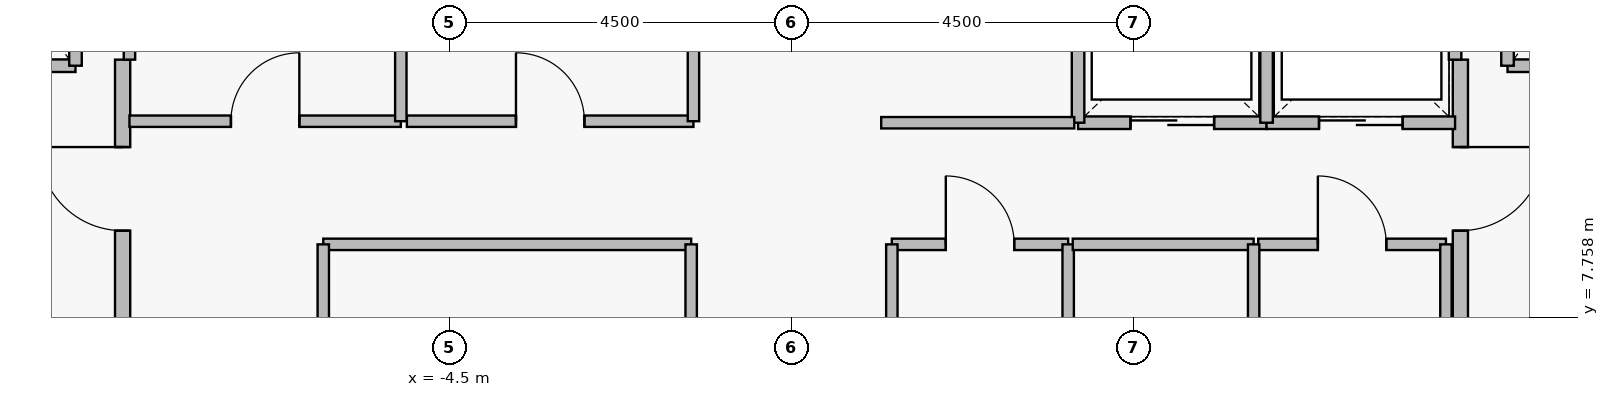
"""IFC4 building model, lengths in metres.
Left out: names, types, materials, properties, quantities, classifications, styles, units other than length and angle.
Written with IfcOpenShell. Run it as: python <this file> out.ifc"""

import sys

from ifc_helpers import new_model, si_unit, direction, frame, frame_2d, origin, place, context, subcontext, project, spatial, rectangle, extrude, element, fill, save


model = new_model("IFC4")
c1 = context("Model", 3, precision=1e-05, world=origin(), true_north=direction((0.0, 1.0)))
c2 = subcontext(c1, "Body", "Model", "MODEL_VIEW")
j1 = project(units=[si_unit("LENGTHUNIT", "METRE"), si_unit("PLANEANGLEUNIT", "RADIAN")], contexts=[c1])
p1 = place(None, origin())
s1 = spatial("IfcSite", under=j1, at=p1, CompositionType="ELEMENT")
p2 = place(p1, origin())
s2 = spatial("IfcBuilding", under=s1, at=p2, CompositionType="ELEMENT")
p3 = place(p2, frame((0.0, 0.0, 284.05)))
s3 = spatial("IfcBuildingStorey", under=s2, at=p3, CompositionType="ELEMENT", Elevation=284.05)
p4 = place(p3, frame((-8.8, 5.05, 0.0), z_axis=(0.0, 0.0, 1.0), x_axis=(0.0, 1.0, 0.0)))
e1 = element("IfcWall", 1, at=p4, inside=s3, PredefinedType="PARTITIONING", context=c2, shape_type="SweptSolid", body=[
    extrude(rectangle(XDim=6.1, YDim=0.2, at=frame_2d((3.05, 0.0))), origin(), (0.0, 0.0, 1.0), 4.18),
])
p5 = place(p4, frame((0.25, 0.0, 0.0)))
e2 = element("IfcOpeningElement", 2, at=p5, cuts=e1, PredefinedType="OPENING", context=c2, shape_type="SweptSolid", body=[
    extrude(rectangle(XDim=1.1, YDim=2.2, at=frame_2d((0.55, 1.1))), frame((0.0, 0.11, 0.0), z_axis=(0.0, -1.0, 0.0), x_axis=(1.0, 0.0, 0.0)), (0.0, 0.0, 1.0), 0.22),
])
p6 = place(p4, frame((3.85, 0.0, 0.0)))
e3 = element("IfcOpeningElement", 3, at=p6, cuts=e1, PredefinedType="OPENING", context=c2, shape_type="SweptSolid", body=[
    extrude(rectangle(XDim=1.1, YDim=2.2, at=frame_2d((0.55, 1.1))), frame((0.0, 0.11, 0.0), z_axis=(0.0, -1.0, 0.0), x_axis=(1.0, 0.0, 0.0)), (0.0, 0.0, 1.0), 0.22),
])
p7 = place(p3, frame((8.8, 11.15, 0.0), z_axis=(0.0, 0.0, 1.0), x_axis=(0.0, -1.0, 0.0)))
e4 = element("IfcWall", 4, at=p7, inside=s3, PredefinedType="PARTITIONING", context=c2, shape_type="SweptSolid", body=[
    extrude(rectangle(XDim=6.1, YDim=0.2, at=frame_2d((3.05, 0.0))), origin(), (0.0, 0.0, 1.0), 4.18),
])
p8 = place(p7, frame((1.15, 0.0, 0.0)))
e5 = element("IfcOpeningElement", 5, at=p8, cuts=e4, PredefinedType="OPENING", context=c2, shape_type="SweptSolid", body=[
    extrude(rectangle(XDim=1.1, YDim=2.2, at=frame_2d((0.55, 1.1))), frame((0.0, 0.11, 0.0), z_axis=(0.0, -1.0, 0.0), x_axis=(1.0, 0.0, 0.0)), (0.0, 0.0, 1.0), 0.22),
])
p9 = place(p7, frame((4.75, 0.0, 0.0)))
e6 = element("IfcOpeningElement", 6, at=p9, cuts=e4, PredefinedType="OPENING", context=c2, shape_type="SweptSolid", body=[
    extrude(rectangle(XDim=1.1, YDim=2.2, at=frame_2d((0.55, 1.1))), frame((0.0, 0.11, 0.0), z_axis=(0.0, -1.0, 0.0), x_axis=(1.0, 0.0, 0.0)), (0.0, 0.0, 1.0), 0.22),
])
p10 = place(p3, frame((-11.58, 11.07, 0.0), z_axis=(0.0, 0.0, 1.0), x_axis=(1.0, 0.0, 0.0)))
e7 = element("IfcWall", 7, at=p10, inside=s3, PredefinedType="PARTITIONING", context=c2, shape_type="SweptSolid", body=[
    extrude(rectangle(XDim=2.16, YDim=0.165, at=frame_2d((1.08, 0.0))), origin(), (0.0, 0.0, 1.0), 4.18),
])
p11 = place(p10, frame((0.53, 0.0, 0.0)))
e8 = element("IfcOpeningElement", 8, at=p11, cuts=e7, PredefinedType="OPENING", context=c2, shape_type="SweptSolid", body=[
    extrude(rectangle(XDim=1.15, YDim=2.25, at=frame_2d((0.575, 1.125))), frame((0.0, 0.093, 0.0), z_axis=(0.0, -1.0, 0.0), x_axis=(1.0, 0.0, 0.0)), (0.0, 0.0, 1.0), 0.185),
])
p12 = place(p3, frame((9.42, 11.07, 0.0), z_axis=(0.0, 0.0, 1.0), x_axis=(1.0, 0.0, 0.0)))
e9 = element("IfcWall", 9, at=p12, inside=s3, PredefinedType="PARTITIONING", context=c2, shape_type="SweptSolid", body=[
    extrude(rectangle(XDim=2.16, YDim=0.165, at=frame_2d((1.08, 0.0))), origin(), (0.0, 0.0, 1.0), 4.18),
])
p13 = place(p12, frame((0.53, 0.0, 0.0)))
e10 = element("IfcOpeningElement", 10, at=p13, cuts=e9, PredefinedType="OPENING", context=c2, shape_type="SweptSolid", body=[
    extrude(rectangle(XDim=1.15, YDim=2.25, at=frame_2d((0.575, 1.125))), frame((0.0, 0.093, 0.0), z_axis=(0.0, -1.0, 0.0), x_axis=(1.0, 0.0, 0.0)), (0.0, 0.0, 1.0), 0.185),
])
p14 = place(p3, frame((3.77, 10.32, 0.0), z_axis=(0.0, 0.0, 1.0), x_axis=(1.0, 0.0, 0.0)))
e11 = element("IfcWall", 11, at=p14, inside=s3, PredefinedType="PARTITIONING", context=c2, shape_type="SweptSolid", body=[
    extrude(rectangle(XDim=2.48, YDim=0.165, at=frame_2d((1.24, 0.0))), origin(), (0.0, 0.0, 1.0), 4.18),
])
p15 = place(p14, frame((0.69, 0.0, 0.0)))
e12 = element("IfcOpeningElement", 12, at=p15, cuts=e11, PredefinedType="OPENING", context=c2, shape_type="SweptSolid", body=[
    extrude(rectangle(XDim=1.1, YDim=2.25, at=frame_2d((0.55, 1.125))), frame((0.0, 0.093, 0.0), z_axis=(0.0, -1.0, 0.0), x_axis=(1.0, 0.0, 0.0)), (0.0, 0.0, 1.0), 0.185),
])
p16 = place(p3, frame((6.25, 10.32, 0.0), z_axis=(0.0, 0.0, 1.0), x_axis=(1.0, 0.0, 0.0)))
e13 = element("IfcWall", 13, at=p16, inside=s3, PredefinedType="PARTITIONING", context=c2, shape_type="SweptSolid", body=[
    extrude(rectangle(XDim=2.48, YDim=0.165, at=frame_2d((1.24, 0.0))), origin(), (0.0, 0.0, 1.0), 4.18),
])
p17 = place(p16, frame((0.69, 0.0, 0.0)))
e14 = element("IfcOpeningElement", 14, at=p17, cuts=e13, PredefinedType="OPENING", context=c2, shape_type="SweptSolid", body=[
    extrude(rectangle(XDim=1.1, YDim=2.25, at=frame_2d((0.55, 1.125))), frame((0.0, 0.093, 0.0), z_axis=(0.0, -1.0, 0.0), x_axis=(1.0, 0.0, 0.0)), (0.0, 0.0, 1.0), 0.185),
])
p18 = place(p3, frame((-8.71, 10.34, 0.0), z_axis=(0.0, 0.0, 1.0), x_axis=(1.0, 0.0, 0.0)))
e15 = element("IfcWall", 15, at=p18, inside=s3, PredefinedType="PARTITIONING", context=c2, shape_type="SweptSolid", body=[
    extrude(rectangle(XDim=3.57, YDim=0.15, at=frame_2d((1.785, 0.0))), origin(), (0.0, 0.0, 1.0), 4.18),
])
p19 = place(p18, frame((1.335, 0.0, 0.0)))
e16 = element("IfcOpeningElement", 16, at=p19, cuts=e15, PredefinedType="OPENING", context=c2, shape_type="SweptSolid", body=[
    extrude(rectangle(XDim=0.9, YDim=2.15, at=frame_2d((0.45, 1.075))), frame((0.0, 0.085, 0.0), z_axis=(0.0, -1.0, 0.0), x_axis=(1.0, 0.0, 0.0)), (0.0, 0.0, 1.0), 0.17),
])
p20 = place(p3, frame((-5.06, 10.34, 0.0), z_axis=(0.0, 0.0, 1.0), x_axis=(1.0, 0.0, 0.0)))
e17 = element("IfcWall", 17, at=p20, inside=s3, PredefinedType="PARTITIONING", context=c2, shape_type="SweptSolid", body=[
    extrude(rectangle(XDim=3.77, YDim=0.15, at=frame_2d((1.885, 0.0))), origin(), (0.0, 0.0, 1.0), 4.18),
])
p21 = place(p20, frame((1.435, 0.0, 0.0)))
e18 = element("IfcOpeningElement", 18, at=p21, cuts=e17, PredefinedType="OPENING", context=c2, shape_type="SweptSolid", body=[
    extrude(rectangle(XDim=0.9, YDim=2.15, at=frame_2d((0.45, 1.075))), frame((0.0, 0.085, 0.0), z_axis=(0.0, -1.0, 0.0), x_axis=(1.0, 0.0, 0.0)), (0.0, 0.0, 1.0), 0.17),
])
p22 = place(p3, frame((1.32, 8.72, 0.0), z_axis=(0.0, 0.0, 1.0), x_axis=(1.0, 0.0, 0.0)))
e19 = element("IfcWall", 19, at=p22, inside=s3, PredefinedType="PARTITIONING", context=c2, shape_type="SweptSolid", body=[
    extrude(rectangle(XDim=2.32, YDim=0.15, at=frame_2d((1.16, 0.0))), origin(), (0.0, 0.0, 1.0), 4.18),
])
p23 = place(p22, frame((0.71, 0.0, 0.0)))
e20 = element("IfcOpeningElement", 20, at=p23, cuts=e19, PredefinedType="OPENING", context=c2, shape_type="SweptSolid", body=[
    extrude(rectangle(XDim=0.9, YDim=2.15, at=frame_2d((0.45, 1.075))), frame((0.0, 0.085, 0.0), z_axis=(0.0, -1.0, 0.0), x_axis=(1.0, 0.0, 0.0)), (0.0, 0.0, 1.0), 0.17),
])
p24 = place(p3, frame((6.14, 8.72, 0.0), z_axis=(0.0, 0.0, 1.0), x_axis=(1.0, 0.0, 0.0)))
e21 = element("IfcWall", 21, at=p24, inside=s3, PredefinedType="PARTITIONING", context=c2, shape_type="SweptSolid", body=[
    extrude(rectangle(XDim=2.47, YDim=0.15, at=frame_2d((1.235, 0.0))), origin(), (0.0, 0.0, 1.0), 4.18),
])
p25 = place(p24, frame((0.785, 0.0, 0.0)))
e22 = element("IfcOpeningElement", 22, at=p25, cuts=e21, PredefinedType="OPENING", context=c2, shape_type="SweptSolid", body=[
    extrude(rectangle(XDim=0.9, YDim=2.15, at=frame_2d((0.45, 1.075))), frame((0.0, 0.085, 0.0), z_axis=(0.0, -1.0, 0.0), x_axis=(1.0, 0.0, 0.0)), (0.0, 0.0, 1.0), 0.17),
])
for number, where, z_axis, x_axis in (
    (23, (-9.42, 11.07, 0.0), (0.0, 0.0, 1.0), (0.0, 1.0, 0.0)),
    (24, (9.42, 11.07, 0.0), (0.0, 0.0, 1.0), (0.0, 1.0, 0.0)),
):
    element("IfcWall", number, at=place(p3, frame(where, z_axis=z_axis, x_axis=x_axis)), inside=s3, PredefinedType="PARTITIONING", context=c2, shape_type="SweptSolid", body=[
        extrude(rectangle(XDim=2.96, YDim=0.165, at=frame_2d((1.48, 0.0))), origin(), (0.0, 0.0, 1.0), 4.18),
    ])
for number, where, z_axis, x_axis in (
    (25, (3.77, 10.32, 0.0), (0.0, 0.0, 1.0), (0.0, 1.0, 0.0)),
    (26, (6.25, 10.32, 0.0), (0.0, 0.0, 1.0), (0.0, 1.0, 0.0)),
):
    element("IfcWall", number, at=place(p3, frame(where, z_axis=z_axis, x_axis=x_axis)), inside=s3, PredefinedType="PARTITIONING", context=c2, shape_type="SweptSolid", body=[
        extrude(rectangle(XDim=2.36, YDim=0.165, at=frame_2d((1.18, 0.0))), origin(), (0.0, 0.0, 1.0), 4.18),
    ])
p26 = place(p3, frame((8.73, 11.15, 0.0), z_axis=(0.0, 0.0, 1.0), x_axis=(0.0, 1.0, 0.0)))
e27 = element("IfcWall", 27, at=p26, inside=s3, PredefinedType="PARTITIONING", context=c2, shape_type="SweptSolid", body=[
    extrude(rectangle(XDim=1.53, YDim=0.165, at=frame_2d((0.765, 0.0))), origin(), (0.0, 0.0, 1.0), 4.18),
])
p27 = place(p3, frame((-8.71, 11.15, 0.0), z_axis=(0.0, 0.0, 1.0), x_axis=(0.0, 1.0, 0.0)))
e28 = element("IfcWall", 28, at=p27, inside=s3, PredefinedType="PARTITIONING", context=c2, shape_type="SweptSolid", body=[
    extrude(rectangle(XDim=1.71, YDim=0.15, at=frame_2d((0.855, 0.0))), origin(), (0.0, 0.0, 1.0), 4.18),
])
for number, where, z_axis, x_axis in (
    (29, (-5.14, 10.34, 0.0), (0.0, 0.0, 1.0), (0.0, 1.0, 0.0)),
    (30, (-1.29, 10.34, 0.0), (0.0, 0.0, 1.0), (0.0, 1.0, 0.0)),
):
    element("IfcWall", number, at=place(p3, frame(where, z_axis=z_axis, x_axis=x_axis)), inside=s3, PredefinedType="PARTITIONING", context=c2, shape_type="SweptSolid", body=[
        extrude(rectangle(XDim=2.52, YDim=0.15, at=frame_2d((1.26, 0.0))), origin(), (0.0, 0.0, 1.0), 4.18),
    ])
p28 = place(p3, frame((-6.16, 8.72, 0.0), z_axis=(0.0, 0.0, 1.0), x_axis=(1.0, 0.0, 0.0)))
e31 = element("IfcWall", 31, at=p28, inside=s3, PredefinedType="PARTITIONING", context=c2, shape_type="SweptSolid", body=[
    extrude(rectangle(XDim=4.84, YDim=0.15, at=frame_2d((2.42, 0.0))), origin(), (0.0, 0.0, 1.0), 4.18),
])
for number, where, z_axis, x_axis in (
    (32, (-6.16, 6.48, 0.0), (0.0, 0.0, 1.0), (0.0, 1.0, 0.0)),
    (33, (-1.32, 6.48, 0.0), (0.0, 0.0, 1.0), (0.0, 1.0, 0.0)),
    (34, (1.32, 6.48, 0.0), (0.0, 0.0, 1.0), (0.0, 1.0, 0.0)),
    (35, (3.64, 6.48, 0.0), (0.0, 0.0, 1.0), (0.0, 1.0, 0.0)),
):
    element("IfcWall", number, at=place(p3, frame(where, z_axis=z_axis, x_axis=x_axis)), inside=s3, PredefinedType="PARTITIONING", context=c2, shape_type="SweptSolid", body=[
        extrude(rectangle(XDim=2.24, YDim=0.15, at=frame_2d((1.12, 0.0))), origin(), (0.0, 0.0, 1.0), 4.18),
    ])
p29 = place(p3, frame((3.7, 8.72, 0.0), z_axis=(0.0, 0.0, 1.0), x_axis=(1.0, 0.0, 0.0)))
e36 = element("IfcWall", 36, at=p29, inside=s3, PredefinedType="PARTITIONING", context=c2, shape_type="SweptSolid", body=[
    extrude(rectangle(XDim=2.38, YDim=0.15, at=frame_2d((1.19, 0.0))), origin(), (0.0, 0.0, 1.0), 4.18),
])
for number, where, z_axis, x_axis in (
    (37, (6.08, 6.48, 0.0), (0.0, 0.0, 1.0), (0.0, 1.0, 0.0)),
    (38, (8.61, 6.48, 0.0), (0.0, 0.0, 1.0), (0.0, 1.0, 0.0)),
):
    element("IfcWall", number, at=place(p3, frame(where, z_axis=z_axis, x_axis=x_axis)), inside=s3, PredefinedType="PARTITIONING", context=c2, shape_type="SweptSolid", body=[
        extrude(rectangle(XDim=2.24, YDim=0.15, at=frame_2d((1.12, 0.0))), origin(), (0.0, 0.0, 1.0), 4.18),
    ])
p30 = place(p3, frame((1.18, 10.32, 0.0), z_axis=(0.0, 0.0, 1.0), x_axis=(1.0, 0.0, 0.0)))
e39 = element("IfcWall", 39, at=p30, inside=s3, PredefinedType="PARTITIONING", context=c2, shape_type="SweptSolid", body=[
    extrude(rectangle(XDim=2.54, YDim=0.15, at=frame_2d((1.27, 0.0))), origin(), (0.0, 0.0, 1.0), 4.18),
])
p31 = place(p6, origin())
e40 = element("IfcDoor", 40, at=p31, inside=s3, OperationType="SINGLE_SWING_RIGHT", PredefinedType="DOOR", context=c2, shape_type="SweptSolid", body=[
    extrude(rectangle(XDim=1.1, YDim=2.2, at=frame_2d((0.55, 1.1))), frame((0.0, 0.025, 0.0), z_axis=(0.0, -1.0, 0.0), x_axis=(1.0, 0.0, 0.0)), (0.0, 0.0, 1.0), 0.05),
])
fill(e3, e40)
p32 = place(p8, origin())
e41 = element("IfcDoor", 41, at=p32, inside=s3, OperationType="SINGLE_SWING_LEFT", PredefinedType="DOOR", context=c2, shape_type="SweptSolid", body=[
    extrude(rectangle(XDim=1.1, YDim=2.2, at=frame_2d((0.55, 1.1))), frame((0.0, 0.025, 0.0), z_axis=(0.0, -1.0, 0.0), x_axis=(1.0, 0.0, 0.0)), (0.0, 0.0, 1.0), 0.05),
])
fill(e5, e41)
p33 = place(p15, origin())
e42 = element("IfcDoor", 42, at=p33, inside=s3, OperationType="SLIDING_TO_LEFT", PredefinedType="DOOR", context=c2, shape_type="SweptSolid", body=[
    extrude(rectangle(XDim=1.1, YDim=2.25, at=frame_2d((0.55, 1.125))), frame((0.0, 0.025, 0.0), z_axis=(0.0, -1.0, 0.0), x_axis=(1.0, 0.0, 0.0)), (0.0, 0.0, 1.0), 0.05),
])
fill(e12, e42)
p34 = place(p17, origin())
e43 = element("IfcDoor", 43, at=p34, inside=s3, OperationType="SLIDING_TO_LEFT", PredefinedType="DOOR", context=c2, shape_type="SweptSolid", body=[
    extrude(rectangle(XDim=1.1, YDim=2.25, at=frame_2d((0.55, 1.125))), frame((0.0, 0.025, 0.0), z_axis=(0.0, -1.0, 0.0), x_axis=(1.0, 0.0, 0.0)), (0.0, 0.0, 1.0), 0.05),
])
fill(e14, e43)
p35 = place(p19, origin())
e44 = element("IfcDoor", 44, at=p35, inside=s3, OperationType="SINGLE_SWING_RIGHT", PredefinedType="DOOR", context=c2, shape_type="SweptSolid", body=[
    extrude(rectangle(XDim=0.9, YDim=2.15, at=frame_2d((0.45, 1.075))), frame((0.0, 0.025, 0.0), z_axis=(0.0, -1.0, 0.0), x_axis=(1.0, 0.0, 0.0)), (0.0, 0.0, 1.0), 0.05),
])
fill(e16, e44)
p36 = place(p21, origin())
e45 = element("IfcDoor", 45, at=p36, inside=s3, OperationType="SINGLE_SWING_LEFT", PredefinedType="DOOR", context=c2, shape_type="SweptSolid", body=[
    extrude(rectangle(XDim=0.9, YDim=2.15, at=frame_2d((0.45, 1.075))), frame((0.0, 0.025, 0.0), z_axis=(0.0, -1.0, 0.0), x_axis=(1.0, 0.0, 0.0)), (0.0, 0.0, 1.0), 0.05),
])
fill(e18, e45)
p37 = place(p23, origin())
e46 = element("IfcDoor", 46, at=p37, inside=s3, OperationType="SINGLE_SWING_LEFT", PredefinedType="DOOR", context=c2, shape_type="SweptSolid", body=[
    extrude(rectangle(XDim=0.9, YDim=2.15, at=frame_2d((0.45, 1.075))), frame((0.0, 0.025, 0.0), z_axis=(0.0, -1.0, 0.0), x_axis=(1.0, 0.0, 0.0)), (0.0, 0.0, 1.0), 0.05),
])
fill(e20, e46)
p38 = place(p25, origin())
e47 = element("IfcDoor", 47, at=p38, inside=s3, OperationType="SINGLE_SWING_LEFT", PredefinedType="DOOR", context=c2, shape_type="SweptSolid", body=[
    extrude(rectangle(XDim=0.9, YDim=2.15, at=frame_2d((0.45, 1.075))), frame((0.0, 0.025, 0.0), z_axis=(0.0, -1.0, 0.0), x_axis=(1.0, 0.0, 0.0)), (0.0, 0.0, 1.0), 0.05),
])
fill(e22, e47)
save(model, sys.argv[1])
